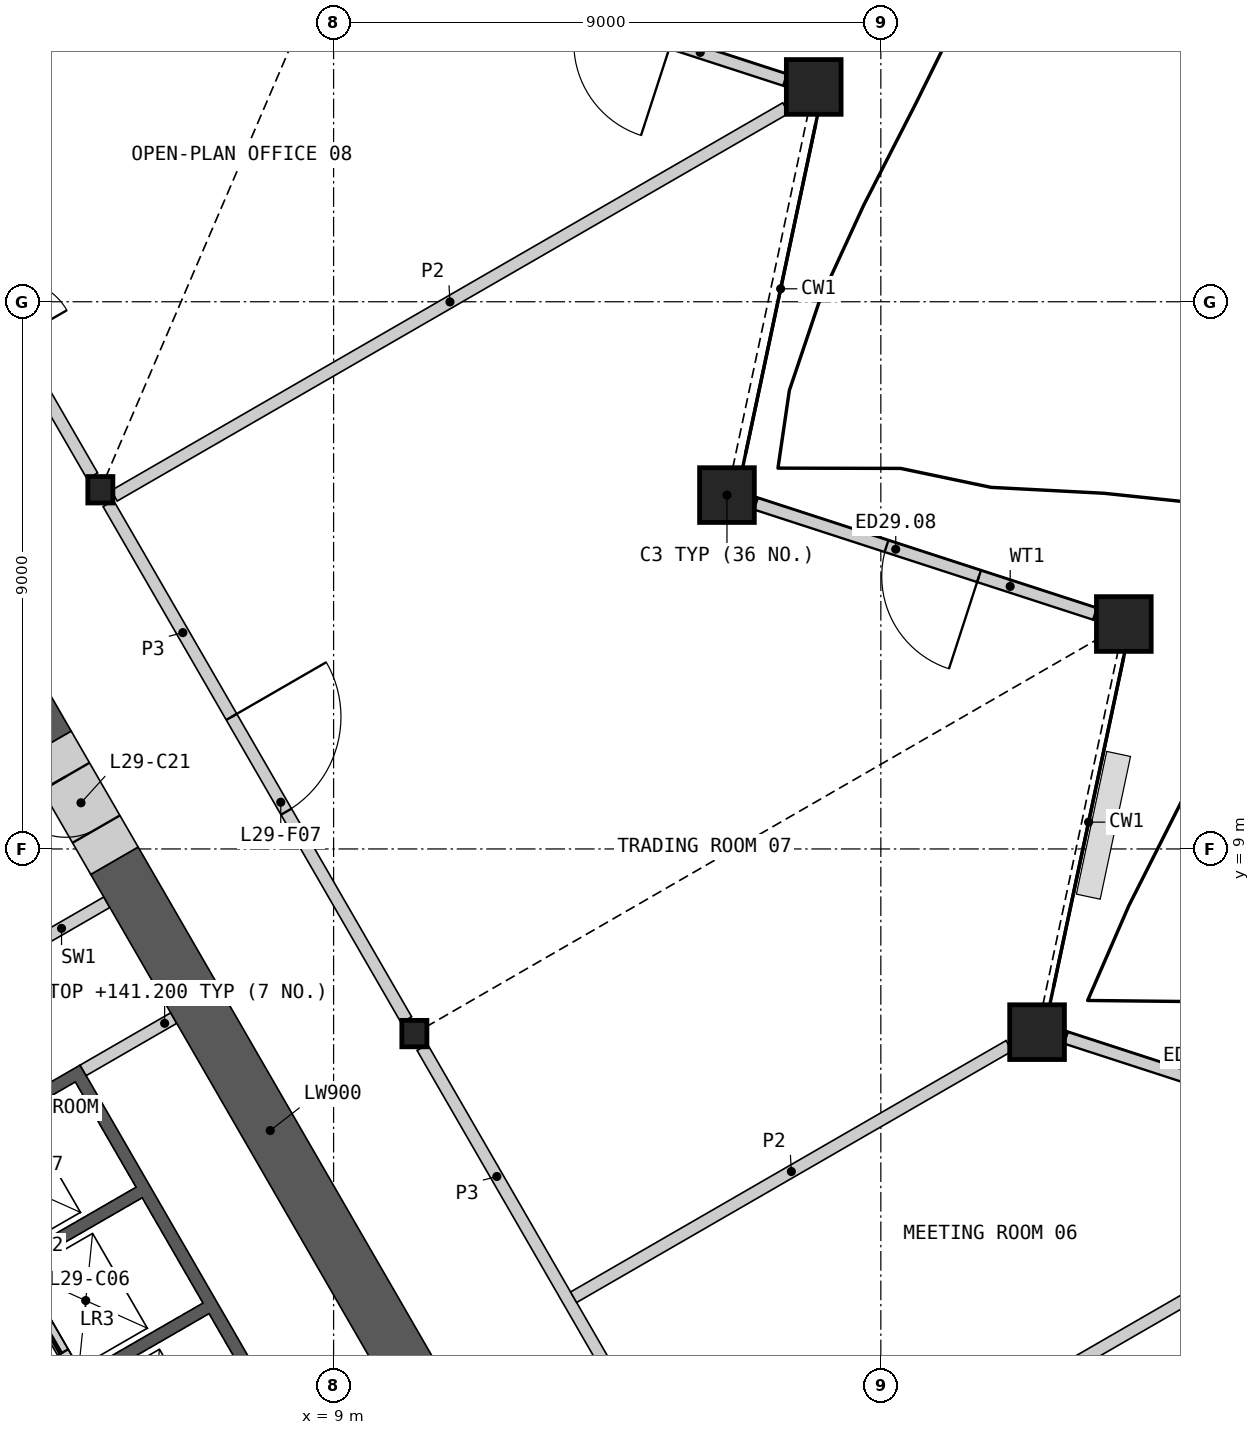
"""IFC4 building model, lengths in metres.
Left out: names, types, materials, properties, quantities, classifications, styles, units other than length and angle.
Written with IfcOpenShell. Run it as: python <this file> out.ifc"""

import sys

from ifc_helpers import new_model, si_unit, direction, frame, frame_2d, origin, origin_2d, place, context, subcontext, project, spatial, polyline, rectangle, hollow_rectangle, i_section, outline, extrude, element, fill, save


model = new_model("IFC4")
c1 = context("Model", 3, precision=1e-05, world=origin(), true_north=direction((0.0, 1.0)))
c2 = subcontext(c1, "Body", "Model", "MODEL_VIEW")
j1 = project(units=[si_unit("LENGTHUNIT", "METRE"), si_unit("PLANEANGLEUNIT", "RADIAN")], contexts=[c1])
p1 = place(None, origin())
s1 = spatial("IfcSite", under=j1, at=p1, CompositionType="ELEMENT")
p2 = place(p1, origin())
s2 = spatial("IfcBuilding", under=s1, at=p2, CompositionType="ELEMENT")
p3 = place(p2, frame((0.0, 0.0, 137.4)))
s3 = spatial("IfcBuildingStorey", under=s2, at=p3, CompositionType="ELEMENT", Elevation=137.4)
for number, where, z_axis, x_axis in (
    (1, (20.57, 5.987, 0.0), (0.0, 0.0, 1.0), (1.0, 0.0, 0.0)),
    (2, (21.996, 12.699, 0.0), (0.0, 0.0, 1.0), (1.0, 0.0, 0.0)),
    (3, (15.469, 14.82, 0.0), (0.0, 0.0, 1.0), (1.0, 0.0, 0.0)),
    (4, (16.896, 21.533, 0.0), (0.0, 0.0, 1.0), (1.0, 0.0, 0.0)),
):
    element("IfcColumn", number, at=place(p3, frame(where, z_axis=z_axis, x_axis=x_axis)), inside=s3, PredefinedType="COLUMN", context=c2, shape_type="SweptSolid", body=[
        extrude(hollow_rectangle(XDim=0.9, YDim=0.9, WallThickness=0.06, at=origin_2d()), origin(), (0.0, 0.0, 1.0), 4.2),
    ])
for number, where, z_axis, x_axis in (
    (5, (10.328, 5.963, 0.0), (0.0, 0.0, 1.0), (1.0, 0.0, 0.0)),
    (6, (5.164, 14.908, 0.0), (0.0, 0.0, 1.0), (1.0, 0.0, 0.0)),
):
    element("IfcColumn", number, at=place(p3, frame(where, z_axis=z_axis, x_axis=x_axis)), inside=s3, PredefinedType="COLUMN", context=c2, shape_type="SweptSolid", body=[
        extrude(i_section(OverallWidth=0.412, OverallDepth=0.435, WebThickness=0.036, FlangeThickness=0.057, at=origin_2d()), origin(), (0.0, 0.0, 1.0), 4.2),
    ])
p4 = place(p3, frame((26.622, 4.082, 0.0), z_axis=(0.0, 0.0, 1.0), x_axis=(-0.951053952554, 0.309024884649, 0.0)))
e7 = element("IfcWall", 7, at=p4, inside=s3, PredefinedType="SOLIDWALL", context=c2, shape_type="SweptSolid", body=[
    extrude(rectangle(XDim=5.865, YDim=0.2, at=frame_2d((2.932, 0.0))), origin(), (0.0, 0.0, 1.0), 3.189),
])
p5 = place(p4, frame((2.042, 0.0, 0.0)))
e8 = element("IfcOpeningElement", 8, at=p5, cuts=e7, PredefinedType="OPENING", context=c2, shape_type="SweptSolid", body=[
    extrude(rectangle(XDim=1.6, YDim=2.4, at=frame_2d((0.8, 1.2))), frame((0.0, 0.11, 0.0), z_axis=(0.0, -1.0, 0.0), x_axis=(1.0, 0.0, 0.0)), (0.0, 0.0, 1.0), 0.22),
])
p6 = place(p3, frame((21.521, 12.865, 0.0), z_axis=(0.0, 0.0, 1.0), x_axis=(-0.951049976734, 0.309037120351, 0.0)))
e9 = element("IfcWall", 9, at=p6, inside=s3, PredefinedType="SOLIDWALL", context=c2, shape_type="SweptSolid", body=[
    extrude(rectangle(XDim=5.864, YDim=0.2, at=frame_2d((2.932, 0.0))), origin(), (0.0, 0.0, 1.0), 3.189),
])
p7 = place(p6, frame((2.005, 0.0, 0.0)))
e10 = element("IfcOpeningElement", 10, at=p7, cuts=e9, PredefinedType="OPENING", context=c2, shape_type="SweptSolid", body=[
    extrude(rectangle(XDim=1.6, YDim=2.4, at=frame_2d((0.8, 1.2))), frame((0.0, 0.11, 0.0), z_axis=(0.0, -1.0, 0.0), x_axis=(1.0, 0.0, 0.0)), (0.0, 0.0, 1.0), 0.22),
])
p8 = place(p3, frame((16.425, 21.647, 0.0), z_axis=(0.0, 0.0, 1.0), x_axis=(-0.951060665462, 0.309004224261, 0.0)))
e11 = element("IfcWall", 11, at=p8, inside=s3, PredefinedType="SOLIDWALL", context=c2, shape_type="SweptSolid", body=[
    extrude(rectangle(XDim=5.868, YDim=0.2, at=frame_2d((2.934, 0.0))), origin(), (0.0, 0.0, 1.0), 3.189),
])
p9 = place(p8, frame((1.971, 0.0, 0.0)))
e12 = element("IfcOpeningElement", 12, at=p9, cuts=e11, PredefinedType="OPENING", context=c2, shape_type="SweptSolid", body=[
    extrude(rectangle(XDim=1.6, YDim=2.4, at=frame_2d((0.8, 1.2))), frame((0.0, 0.11, 0.0), z_axis=(0.0, -1.0, 0.0), x_axis=(1.0, 0.0, 0.0)), (0.0, 0.0, 1.0), 0.22),
])
p10 = place(p3, origin())
e13 = element("IfcWall", 13, at=p10, inside=s3, PredefinedType="SHEAR", context=c2, shape_type="SweptSolid", body=[
    extrude(outline(polyline([(2.66, 4.192), (4.831, 5.445), (8.231, -0.444), (6.061, -1.697), (5.96, -1.524), (7.952, -0.374), (6.952, 1.358), (4.96, 0.208), (4.861, 0.381), (6.852, 1.531), (5.852, 3.263), (3.861, 2.113), (3.76, 2.287), (5.752, 3.437), (4.752, 5.169), (2.76, 4.019), (2.66, 4.192)])), origin(), (0.0, 0.0, 1.0), 3.8),
])
p11 = place(p3, frame((5.817, -1.476, 0.0), z_axis=(0.0, 0.0, 1.0), x_axis=(-0.500002616675, 0.866023893041, 0.0)))
e14 = element("IfcWall", 14, at=p11, inside=s3, PredefinedType="SOLIDWALL", context=c2, shape_type="SweptSolid", body=[
    extrude(rectangle(XDim=8.373, YDim=0.2, at=frame_2d((4.187, 0.0))), origin(), (0.0, 0.0, 1.0), 3.8),
])
p12 = place(p11, frame((0.337, 0.0, 0.0)))
e15 = element("IfcOpeningElement", 15, at=p12, cuts=e14, PredefinedType="OPENING", context=c2, shape_type="SweptSolid", body=[
    extrude(rectangle(XDim=1.1, YDim=2.1, at=frame_2d((0.55, 1.05))), frame((0.0, 0.11, 0.0), z_axis=(0.0, -1.0, 0.0), x_axis=(1.0, 0.0, 0.0)), (0.0, 0.0, 1.0), 0.22),
])
p13 = place(p11, frame((2.537, 0.0, 0.0)))
e16 = element("IfcOpeningElement", 16, at=p13, cuts=e14, PredefinedType="OPENING", context=c2, shape_type="SweptSolid", body=[
    extrude(rectangle(XDim=1.1, YDim=2.1, at=frame_2d((0.55, 1.05))), frame((0.0, 0.11, 0.0), z_axis=(0.0, -1.0, 0.0), x_axis=(1.0, 0.0, 0.0)), (0.0, 0.0, 1.0), 0.22),
])
p14 = place(p11, frame((4.737, 0.0, 0.0)))
e17 = element("IfcOpeningElement", 17, at=p14, cuts=e14, PredefinedType="OPENING", context=c2, shape_type="SweptSolid", body=[
    extrude(rectangle(XDim=1.1, YDim=2.1, at=frame_2d((0.55, 1.05))), frame((0.0, 0.11, 0.0), z_axis=(0.0, -1.0, 0.0), x_axis=(1.0, 0.0, 0.0)), (0.0, 0.0, 1.0), 0.22),
])
p15 = place(p11, frame((7.037, 0.0, 0.0)))
e18 = element("IfcOpeningElement", 18, at=p15, cuts=e14, PredefinedType="OPENING", context=c2, shape_type="SweptSolid", body=[
    extrude(rectangle(XDim=0.9, YDim=2.1, at=frame_2d((0.45, 1.05))), frame((0.0, 0.11, 0.0), z_axis=(0.0, -1.0, 0.0), x_axis=(1.0, 0.0, 0.0)), (0.0, 0.0, 1.0), 0.22),
])
for number, where, z_axis, x_axis in (
    (19, (4.881, 5.358, 0.0), (0.0, 0.0, 1.0), (0.866, 0.5, 0.0)),
    (20, (3.781, 7.263, 0.0), (0.0, 0.0, 1.0), (0.866, 0.5, 0.0)),
):
    element("IfcWall", number, at=place(p3, frame(where, z_axis=z_axis, x_axis=x_axis)), inside=s3, PredefinedType="SHEAR", context=c2, shape_type="SweptSolid", body=[
        extrude(rectangle(XDim=1.72, YDim=0.2, at=frame_2d((0.86, 0.0))), origin(), (0.0, 0.0, 1.0), 3.8),
    ])
p16 = place(p3, frame((10.521, -0.07, 0.0), z_axis=(0.0, 0.0, 1.0), x_axis=(-0.499997384719, 0.866026913713, 0.0)))
e21 = element("IfcWall", 21, at=p16, inside=s3, PredefinedType="SHEAR", context=c2, shape_type="SweptSolid", body=[
    extrude(rectangle(XDim=10.249, YDim=0.9, at=frame_2d((5.125, 0.0))), origin(), (0.0, 0.0, 1.0), 3.8),
])
p17 = place(p3, frame((4.296, 10.712, 0.0), z_axis=(0.0, 0.0, 1.0), x_axis=(-0.500011000363, 0.866019052629, 0.0)))
e22 = element("IfcWall", 22, at=p17, inside=s3, PredefinedType="SHEAR", context=c2, shape_type="SweptSolid", body=[
    extrude(rectangle(XDim=7.812, YDim=0.9, at=frame_2d((3.906, 0.0))), origin(), (0.0, 0.0, 1.0), 3.8),
])
p18 = place(p3, frame((5.396, 8.806, 0.0), z_axis=(0.0, 0.0, 1.0), x_axis=(-0.499981787252, 0.866035918664, 0.0)))
e23 = element("IfcWall", 23, at=p18, inside=s3, PredefinedType="SHEAR", context=c2, shape_type="SweptSolid", body=[
    extrude(rectangle(XDim=2.2, YDim=0.9, at=frame_2d((1.1, 0.0))), origin(), (0.0, 0.0, 1.0), 3.8),
])
p19 = place(p18, frame((0.6, 0.0, 0.0)))
e24 = element("IfcOpeningElement", 24, at=p19, cuts=e23, PredefinedType="OPENING", context=c2, shape_type="SweptSolid", body=[
    extrude(rectangle(XDim=1.0, YDim=2.1, at=frame_2d((0.5, 1.05))), frame((0.0, 0.46, 0.0), z_axis=(0.0, -1.0, 0.0), x_axis=(1.0, 0.0, 0.0)), (0.0, 0.0, 1.0), 0.92),
])
p20 = place(p3, frame((10.46, 5.736, 0.0), z_axis=(0.0, 0.0, 1.0), x_axis=(0.500004141693, -0.866023012564, 0.0)))
e25 = element("IfcWall", 25, at=p20, inside=s3, PredefinedType="PARTITIONING", context=c2, shape_type="SweptSolid", body=[
    extrude(rectangle(XDim=9.803, YDim=0.2, at=frame_2d((4.902, 0.0))), origin(), (0.0, 0.0, 1.0), 3.8),
])
p21 = place(p20, frame((6.853, 0.0, 0.0)))
e26 = element("IfcOpeningElement", 26, at=p21, cuts=e25, PredefinedType="OPENING", context=c2, shape_type="SweptSolid", body=[
    extrude(rectangle(XDim=1.0, YDim=2.1, at=frame_2d((0.5, 1.05))), frame((0.0, 0.11, 0.0), z_axis=(0.0, -1.0, 0.0), x_axis=(1.0, 0.0, 0.0)), (0.0, 0.0, 1.0), 0.22),
])
p22 = place(p3, frame((5.295, 14.68, 0.0), z_axis=(0.0, 0.0, 1.0), x_axis=(0.500012035596, -0.866018454918, 0.0)))
e27 = element("IfcWall", 27, at=p22, inside=s3, PredefinedType="PARTITIONING", context=c2, shape_type="SweptSolid", body=[
    extrude(rectangle(XDim=9.803, YDim=0.2, at=frame_2d((4.902, 0.0))), origin(), (0.0, 0.0, 1.0), 3.8),
])
p23 = place(p22, frame((4.052, 0.0, 0.0)))
e28 = element("IfcOpeningElement", 28, at=p23, cuts=e27, PredefinedType="OPENING", context=c2, shape_type="SweptSolid", body=[
    extrude(rectangle(XDim=1.8, YDim=2.1, at=frame_2d((0.9, 1.05))), frame((0.0, 0.11, 0.0), z_axis=(0.0, -1.0, 0.0), x_axis=(1.0, 0.0, 0.0)), (0.0, 0.0, 1.0), 0.22),
])
p24 = place(p3, frame((1.913, 20.539, 0.0), z_axis=(0.0, 0.0, 1.0), x_axis=(0.499980978912, -0.866036385336, 0.0)))
e29 = element("IfcWall", 29, at=p24, inside=s3, PredefinedType="PARTITIONING", context=c2, shape_type="SweptSolid", body=[
    extrude(rectangle(XDim=6.24, YDim=0.2, at=frame_2d((3.12, 0.0))), origin(), (0.0, 0.0, 1.0), 3.8),
])
p25 = place(p24, frame((2.67, 0.0, 0.0)))
e30 = element("IfcOpeningElement", 30, at=p25, cuts=e29, PredefinedType="OPENING", context=c2, shape_type="SweptSolid", body=[
    extrude(rectangle(XDim=1.0, YDim=2.1, at=frame_2d((0.5, 1.05))), frame((0.0, 0.11, 0.0), z_axis=(0.0, -1.0, 0.0), x_axis=(1.0, 0.0, 0.0)), (0.0, 0.0, 1.0), 0.22),
])
p26 = place(p3, frame((2.034, 20.523, 0.0), z_axis=(0.0, 0.0, 1.0), x_axis=(0.713664516359, 0.700487657343, 0.0)))
e31 = element("IfcWall", 31, at=p26, inside=s3, PredefinedType="PARTITIONING", context=c2, shape_type="SweptSolid", body=[
    extrude(rectangle(XDim=13.396, YDim=0.2, at=frame_2d((6.698, 0.0))), origin(), (0.0, 0.0, 1.0), 2.885),
])
p27 = place(p3, frame((15.488, -2.754, 0.0), z_axis=(0.0, 0.0, 1.0), x_axis=(0.866026411352, 0.499998254837, 0.0)))
e32 = element("IfcWall", 32, at=p27, inside=s3, PredefinedType="PARTITIONING", context=c2, shape_type="SweptSolid", body=[
    extrude(rectangle(XDim=12.873, YDim=0.2, at=frame_2d((6.437, 0.0))), origin(), (0.0, 0.0, 1.0), 2.885),
])
p28 = place(p3, frame((5.392, 14.809, 0.0), z_axis=(0.0, 0.0, 1.0), x_axis=(0.866023321739, 0.500003606191, 0.0)))
e33 = element("IfcWall", 33, at=p28, inside=s3, PredefinedType="PARTITIONING", context=c2, shape_type="SweptSolid", body=[
    extrude(rectangle(XDim=12.753, YDim=0.2, at=frame_2d((6.377, 0.0))), origin(), (0.0, 0.0, 1.0), 2.885),
])
p29 = place(p3, frame((12.947, 1.627, 0.0), z_axis=(0.0, 0.0, 1.0), x_axis=(0.866034669089, 0.499983951678, 0.0)))
e34 = element("IfcWall", 34, at=p29, inside=s3, PredefinedType="PARTITIONING", context=c2, shape_type="SweptSolid", body=[
    extrude(rectangle(XDim=8.27, YDim=0.2, at=frame_2d((4.135, 0.0))), origin(), (0.0, 0.0, 1.0), 2.885),
])
p30 = place(p7, origin())
e35 = element("IfcDoor", 35, at=p30, inside=s3, OperationType="DOUBLE_DOOR_SINGLE_SWING", PredefinedType="DOOR", context=c2, shape_type="SweptSolid", body=[
    extrude(rectangle(XDim=1.6, YDim=2.4, at=frame_2d((0.8, 1.2))), frame((0.0, 0.025, 0.0), z_axis=(0.0, -1.0, 0.0), x_axis=(1.0, 0.0, 0.0)), (0.0, 0.0, 1.0), 0.05),
])
fill(e10, e35)
p31 = place(p13, origin())
e36 = element("IfcDoor", 36, at=p31, inside=s3, OperationType="SLIDING_TO_LEFT", PredefinedType="DOOR", context=c2, shape_type="SweptSolid", body=[
    extrude(rectangle(XDim=1.1, YDim=2.1, at=frame_2d((0.55, 1.05))), frame((0.0, 0.025, 0.0), z_axis=(0.0, -1.0, 0.0), x_axis=(1.0, 0.0, 0.0)), (0.0, 0.0, 1.0), 0.05),
])
fill(e16, e36)
p32 = place(p19, origin())
e37 = element("IfcDoor", 37, at=p32, inside=s3, OperationType="SINGLE_SWING_RIGHT", PredefinedType="DOOR", context=c2, shape_type="SweptSolid", body=[
    extrude(rectangle(XDim=1.0, YDim=2.1, at=frame_2d((0.5, 1.05))), frame((0.0, 0.205, 0.0), z_axis=(0.0, -1.0, 0.0), x_axis=(1.0, 0.0, 0.0)), (0.0, 0.0, 1.0), 0.05),
])
fill(e24, e37)
p33 = place(p23, origin())
e38 = element("IfcDoor", 38, at=p33, inside=s3, OperationType="DOUBLE_DOOR_SINGLE_SWING", PredefinedType="DOOR", context=c2, shape_type="SweptSolid", body=[
    extrude(rectangle(XDim=1.8, YDim=2.1, at=frame_2d((0.9, 1.05))), frame((0.0, 0.025, 0.0), z_axis=(0.0, -1.0, 0.0), x_axis=(1.0, 0.0, 0.0)), (0.0, 0.0, 1.0), 0.05),
])
fill(e28, e38)
save(model, sys.argv[1])
